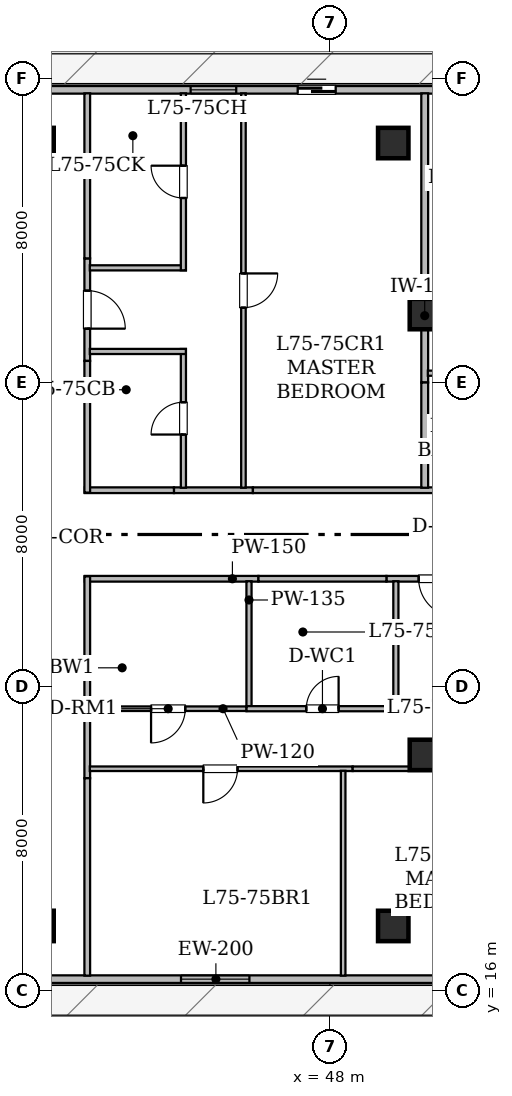
"""IFC4 building model, lengths in metres.
Left out: names, types, materials, properties, quantities, classifications, styles, units other than length and angle.
Written with IfcOpenShell. Run it as: python <this file> out.ifc"""

import sys

from ifc_helpers import new_model, si_unit, direction, frame, frame_2d, origin, origin_2d, place, context, subcontext, project, spatial, rectangle, hollow_rectangle, extrude, element, fill, save


model = new_model("IFC4")
c1 = context("Model", 3, precision=1e-05, world=origin(), true_north=direction((0.0, 1.0)))
c2 = subcontext(c1, "Body", "Model", "MODEL_VIEW")
j1 = project(units=[si_unit("LENGTHUNIT", "METRE"), si_unit("PLANEANGLEUNIT", "RADIAN")], contexts=[c1])
p1 = place(None, origin())
s1 = spatial("IfcSite", under=j1, at=p1, CompositionType="ELEMENT")
p2 = place(p1, origin())
s2 = spatial("IfcBuilding", under=s1, at=p2, CompositionType="ELEMENT")
p3 = place(p2, frame((0.0, 0.0, 294.65)))
s3 = spatial("IfcBuildingStorey", under=s2, at=p3, CompositionType="ELEMENT", Elevation=294.65)
for number, where, z_axis, x_axis in (
    (1, (40.333, 17.7, 0.025), (0.0, 0.0, 1.0), (1.0, 0.0, 0.0)),
    (2, (49.667, 17.7, 0.025), (0.0, 0.0, 1.0), (1.0, 0.0, 0.0)),
    (3, (40.333, 38.3, 0.025), (0.0, 0.0, 1.0), (1.0, 0.0, 0.0)),
    (4, (49.667, 38.3, 0.025), (0.0, 0.0, 1.0), (1.0, 0.0, 0.0)),
):
    element("IfcColumn", number, at=place(p3, frame(where, z_axis=z_axis, x_axis=x_axis)), inside=s3, PredefinedType="COLUMN", context=c2, shape_type="SweptSolid", body=[
        extrude(hollow_rectangle(XDim=0.8, YDim=0.8, WallThickness=0.04, at=origin_2d()), origin(), (0.0, 0.0, 1.0), 4.175),
    ])
for number, where, z_axis, x_axis in (
    (5, (50.5, 22.2, 0.0), (0.0, 0.0, 1.0), (1.0, 0.0, 0.0)),
    (6, (50.5, 33.8, 0.0), (0.0, 0.0, 1.0), (1.0, 0.0, 0.0)),
):
    element("IfcColumn", number, at=place(p3, frame(where, z_axis=z_axis, x_axis=x_axis)), inside=s3, PredefinedType="COLUMN", context=c2, shape_type="SweptSolid", body=[
        extrude(hollow_rectangle(XDim=0.8, YDim=0.8, WallThickness=0.04, at=origin_2d()), origin(), (0.0, 0.0, 1.0), 4.2),
    ])
p4 = place(p3, frame((60.759, 16.3, 0.0), z_axis=(0.0, 0.0, 1.0), x_axis=(-1.0, 0.0, 0.0)))
e7 = element("IfcWall", 7, at=p4, inside=s3, PredefinedType="STANDARD", context=c2, shape_type="SweptSolid", body=[
    extrude(rectangle(XDim=31.518, YDim=0.2, at=frame_2d((15.759, 0.0))), origin(), (0.0, 0.0, 1.0), 3.95),
])
p5 = place(p4, frame((6.066, 0.0, 0.0)))
e8 = element("IfcOpeningElement", 8, at=p5, cuts=e7, PredefinedType="OPENING", context=c2, shape_type="SweptSolid", body=[
    extrude(rectangle(XDim=1.0, YDim=2.15, at=frame_2d((0.5, 1.075))), frame((0.0, 0.11, 0.0), z_axis=(0.0, -1.0, 0.0), x_axis=(1.0, 0.0, 0.0)), (0.0, 0.0, 1.0), 0.22),
])
p6 = place(p4, frame((14.877, 0.0, 0.85)))
e9 = element("IfcOpeningElement", 9, at=p6, cuts=e7, PredefinedType="OPENING", context=c2, shape_type="SweptSolid", body=[
    extrude(rectangle(XDim=1.8, YDim=0.92, at=frame_2d((0.9, 0.46))), frame((0.0, 0.11, 0.0), z_axis=(0.0, -1.0, 0.0), x_axis=(1.0, 0.0, 0.0)), (0.0, 0.0, 1.0), 0.22),
])
p7 = place(p3, frame((29.302, 39.7, 0.0), z_axis=(0.0, 0.0, 1.0), x_axis=(1.0, 0.0, 0.0)))
e10 = element("IfcWall", 10, at=p7, inside=s3, PredefinedType="STANDARD", context=c2, shape_type="SweptSolid", body=[
    extrude(rectangle(XDim=31.457, YDim=0.2, at=frame_2d((15.729, 0.0))), origin(), (0.0, 0.0, 1.0), 3.95),
])
p8 = place(p7, frame((17.85, 0.0, 0.0)))
e11 = element("IfcOpeningElement", 11, at=p8, cuts=e10, PredefinedType="OPENING", context=c2, shape_type="SweptSolid", body=[
    extrude(rectangle(XDim=1.0, YDim=2.15, at=frame_2d((0.5, 1.075))), frame((0.0, 0.11, 0.0), z_axis=(0.0, -1.0, 0.0), x_axis=(1.0, 0.0, 0.0)), (0.0, 0.0, 1.0), 0.22),
])
p9 = place(p7, frame((15.033, 0.0, 0.78)))
e12 = element("IfcOpeningElement", 12, at=p9, cuts=e10, PredefinedType="OPENING", context=c2, shape_type="SweptSolid", body=[
    extrude(rectangle(XDim=1.2, YDim=1.5, at=frame_2d((0.6, 0.75))), frame((0.0, 0.11, 0.0), z_axis=(0.0, -1.0, 0.0), x_axis=(1.0, 0.0, 0.0)), (0.0, 0.0, 1.0), 0.22),
])
p10 = place(p7, frame((23.979, 0.0, 0.85)))
e13 = element("IfcOpeningElement", 13, at=p10, cuts=e10, PredefinedType="OPENING", context=c2, shape_type="SweptSolid", body=[
    extrude(rectangle(XDim=1.8, YDim=0.92, at=frame_2d((0.9, 0.46))), frame((0.0, 0.11, 0.0), z_axis=(0.0, -1.0, 0.0), x_axis=(1.0, 0.0, 0.0)), (0.0, 0.0, 1.0), 0.22),
])
p11 = place(p3, frame((46.12, 26.835, 0.0), z_axis=(0.0, 0.0, 1.0), x_axis=(-1.0, 0.0, 0.0)))
e14 = element("IfcWall", 14, at=p11, inside=s3, PredefinedType="STANDARD", context=c2, shape_type="SweptSolid", body=[
    extrude(rectangle(XDim=4.57, YDim=0.15, at=frame_2d((2.285, 0.0))), origin(), (0.0, 0.0, 1.0), 3.95),
])
p12 = place(p3, frame((41.615, 26.898, 0.0), z_axis=(0.0, 0.0, 1.0), x_axis=(0.0, -1.0, 0.0)))
e15 = element("IfcWall", 15, at=p12, inside=s3, PredefinedType="STANDARD", context=c2, shape_type="SweptSolid", body=[
    extrude(rectangle(XDim=3.731, YDim=0.15, at=frame_2d((1.865, 0.0))), origin(), (0.0, 0.0, 1.0), 3.245),
])
p13 = place(p3, frame((52.185, 26.835, 0.0), z_axis=(0.0, 0.0, 1.0), x_axis=(-1.0, 0.0, 0.0)))
e16 = element("IfcWall", 16, at=p13, inside=s3, PredefinedType="STANDARD", context=c2, shape_type="SweptSolid", body=[
    extrude(rectangle(XDim=2.698, YDim=0.15, at=frame_2d((1.349, 0.0))), origin(), (0.0, 0.0, 1.0), 3.245),
])
p14 = place(p13, frame((0.849, 0.0, 0.0)))
e17 = element("IfcOpeningElement", 17, at=p14, cuts=e16, PredefinedType="OPENING", context=c2, shape_type="SweptSolid", body=[
    extrude(rectangle(XDim=1.0, YDim=2.15, at=frame_2d((0.5, 1.075))), frame((0.0, 0.085, 0.0), z_axis=(0.0, -1.0, 0.0), x_axis=(1.0, 0.0, 0.0)), (0.0, 0.0, 1.0), 0.17),
])
p15 = place(p3, frame((41.615, 23.167, 0.0), z_axis=(0.0, 0.0, 1.0), x_axis=(0.0, -1.0, 0.0)))
e18 = element("IfcWall", 18, at=p15, inside=s3, PredefinedType="STANDARD", context=c2, shape_type="SweptSolid", body=[
    extrude(rectangle(XDim=1.58, YDim=0.15, at=frame_2d((0.79, 0.0))), origin(), (0.0, 0.0, 1.0), 3.95),
])
p16 = place(p3, frame((49.487, 26.835, 0.0), z_axis=(0.0, 0.0, 1.0), x_axis=(-1.0, 0.0, 0.0)))
e19 = element("IfcWall", 19, at=p16, inside=s3, PredefinedType="STANDARD", context=c2, shape_type="SweptSolid", body=[
    extrude(rectangle(XDim=3.367, YDim=0.15, at=frame_2d((1.684, 0.0))), origin(), (0.0, 0.0, 1.0), 3.95),
])
p17 = place(p3, frame((41.615, 21.587, 0.0), z_axis=(0.0, 0.0, 1.0), x_axis=(0.0, -1.0, 0.0)))
e20 = element("IfcWall", 20, at=p17, inside=s3, PredefinedType="STANDARD", context=c2, shape_type="SweptSolid", body=[
    extrude(rectangle(XDim=5.195, YDim=0.15, at=frame_2d((2.597, 0.0))), origin(), (0.0, 0.0, 1.0), 3.407),
])
p18 = place(p3, frame((43.896, 29.165, 0.0), z_axis=(0.0, 0.0, 1.0), x_axis=(1.0, 0.0, 0.0)))
e21 = element("IfcWall", 21, at=p18, inside=s3, PredefinedType="STANDARD", context=c2, shape_type="SweptSolid", body=[
    extrude(rectangle(XDim=2.078, YDim=0.15, at=frame_2d((1.039, 0.0))), origin(), (0.0, 0.0, 1.0), 3.95),
])
p19 = place(p3, frame((41.615, 35.265, 0.0), z_axis=(0.0, 0.0, 1.0), x_axis=(0.0, -1.0, 0.0)))
e22 = element("IfcWall", 22, at=p19, inside=s3, PredefinedType="STANDARD", context=c2, shape_type="SweptSolid", body=[
    extrude(rectangle(XDim=2.698, YDim=0.15, at=frame_2d((1.349, 0.0))), origin(), (0.0, 0.0, 1.0), 3.95),
])
p20 = place(p19, frame((0.849, 0.0, 0.0)))
e23 = element("IfcOpeningElement", 23, at=p20, cuts=e22, PredefinedType="OPENING", context=c2, shape_type="SweptSolid", body=[
    extrude(rectangle(XDim=1.0, YDim=2.15, at=frame_2d((0.5, 1.075))), frame((0.0, 0.085, 0.0), z_axis=(0.0, -1.0, 0.0), x_axis=(1.0, 0.0, 0.0)), (0.0, 0.0, 1.0), 0.17),
])
p21 = place(p3, frame((41.55, 29.165, 0.0), z_axis=(0.0, 0.0, 1.0), x_axis=(1.0, 0.0, 0.0)))
e24 = element("IfcWall", 24, at=p21, inside=s3, PredefinedType="STANDARD", context=c2, shape_type="SweptSolid", body=[
    extrude(rectangle(XDim=2.346, YDim=0.15, at=frame_2d((1.173, 0.0))), origin(), (0.0, 0.0, 1.0), 3.95),
])
p22 = place(p3, frame((41.615, 32.567, 0.0), z_axis=(0.0, 0.0, 1.0), x_axis=(0.0, -1.0, 0.0)))
e25 = element("IfcWall", 25, at=p22, inside=s3, PredefinedType="STANDARD", context=c2, shape_type="SweptSolid", body=[
    extrude(rectangle(XDim=3.465, YDim=0.15, at=frame_2d((1.732, 0.0))), origin(), (0.0, 0.0, 1.0), 3.95),
])
p23 = place(p3, frame((41.615, 39.608, 0.0), z_axis=(0.0, 0.0, 1.0), x_axis=(0.0, -1.0, 0.0)))
e26 = element("IfcWall", 26, at=p23, inside=s3, PredefinedType="STANDARD", context=c2, shape_type="SweptSolid", body=[
    extrude(rectangle(XDim=4.343, YDim=0.15, at=frame_2d((2.171, 0.0))), origin(), (0.0, 0.0, 1.0), 3.245),
])
p24 = place(p3, frame((45.974, 29.165, 0.0), z_axis=(0.0, 0.0, 1.0), x_axis=(1.0, 0.0, 0.0)))
e27 = element("IfcWall", 27, at=p24, inside=s3, PredefinedType="STANDARD", context=c2, shape_type="SweptSolid", body=[
    extrude(rectangle(XDim=4.77, YDim=0.15, at=frame_2d((2.385, 0.0))), origin(), (0.0, 0.0, 1.0), 3.245),
])
p25 = place(p3, frame((45.806, 23.416, 0.0), z_axis=(0.0, 0.0, 1.0), x_axis=(-1.0, 0.0, 0.0)))
e28 = element("IfcWall", 28, at=p25, inside=s3, PredefinedType="PARTITIONING", context=c2, shape_type="SweptSolid", body=[
    extrude(rectangle(XDim=4.124, YDim=0.12, at=frame_2d((2.062, 0.0))), origin(), (0.0, 0.0, 1.0), 3.245),
])
p26 = place(p25, frame((1.612, 0.0, 0.0)))
e29 = element("IfcOpeningElement", 29, at=p26, cuts=e28, PredefinedType="OPENING", context=c2, shape_type="SweptSolid", body=[
    extrude(rectangle(XDim=0.9, YDim=2.1, at=frame_2d((0.45, 1.05))), frame((0.0, 0.07, 0.0), z_axis=(0.0, -1.0, 0.0), x_axis=(1.0, 0.0, 0.0)), (0.0, 0.0, 1.0), 0.14),
])
p27 = place(p3, frame((45.871, 26.77, 0.0), z_axis=(0.0, 0.0, 1.0), x_axis=(0.0, -1.0, 0.0)))
e30 = element("IfcWall", 30, at=p27, inside=s3, PredefinedType="PARTITIONING", context=c2, shape_type="SweptSolid", body=[
    extrude(rectangle(XDim=3.289, YDim=0.135, at=frame_2d((1.645, 0.0))), origin(), (0.0, 0.0, 1.0), 3.95),
])
p28 = place(p3, frame((45.806, 23.416, 0.0), z_axis=(0.0, 0.0, 1.0), x_axis=(1.0, 0.0, 0.0)))
e31 = element("IfcWall", 31, at=p28, inside=s3, PredefinedType="PARTITIONING", context=c2, shape_type="SweptSolid", body=[
    extrude(rectangle(XDim=3.995, YDim=0.135, at=frame_2d((1.998, 0.0))), origin(), (0.0, 0.0, 1.0), 3.245),
])
p29 = place(p28, frame((1.573, 0.0, 0.0)))
e32 = element("IfcOpeningElement", 32, at=p29, cuts=e31, PredefinedType="OPENING", context=c2, shape_type="SweptSolid", body=[
    extrude(rectangle(XDim=0.85, YDim=2.1, at=frame_2d((0.425, 1.05))), frame((0.0, 0.077, 0.0), z_axis=(0.0, -1.0, 0.0), x_axis=(1.0, 0.0, 0.0)), (0.0, 0.0, 1.0), 0.155),
])
p30 = place(p3, frame((49.736, 23.351, 0.0), z_axis=(0.0, 0.0, 1.0), x_axis=(0.0, 1.0, 0.0)))
e33 = element("IfcWall", 33, at=p30, inside=s3, PredefinedType="PARTITIONING", context=c2, shape_type="SweptSolid", body=[
    extrude(rectangle(XDim=3.419, YDim=0.135, at=frame_2d((1.709, 0.0))), origin(), (0.0, 0.0, 1.0), 3.95),
])
p31 = place(p3, frame((48.599, 21.836, 0.0), z_axis=(0.0, 0.0, 1.0), x_axis=(-1.0, 0.0, 0.0)))
e34 = element("IfcWall", 34, at=p31, inside=s3, PredefinedType="PARTITIONING", context=c2, shape_type="SweptSolid", body=[
    extrude(rectangle(XDim=6.917, YDim=0.12, at=frame_2d((3.458, 0.0))), origin(), (0.0, 0.0, 1.0), 3.95),
])
p32 = place(p31, frame((3.03, 0.0, 0.0)))
e35 = element("IfcOpeningElement", 35, at=p32, cuts=e34, PredefinedType="OPENING", context=c2, shape_type="SweptSolid", body=[
    extrude(rectangle(XDim=0.9, YDim=2.1, at=frame_2d((0.45, 1.05))), frame((0.0, 0.07, 0.0), z_axis=(0.0, -1.0, 0.0), x_axis=(1.0, 0.0, 0.0)), (0.0, 0.0, 1.0), 0.14),
])
p33 = place(p3, frame((56.802, 21.836, 0.0), z_axis=(0.0, 0.0, 1.0), x_axis=(-1.0, 0.0, 0.0)))
e36 = element("IfcWall", 36, at=p33, inside=s3, PredefinedType="PARTITIONING", context=c2, shape_type="SweptSolid", body=[
    extrude(rectangle(XDim=8.203, YDim=0.12, at=frame_2d((4.102, 0.0))), origin(), (0.0, 0.0, 1.0), 3.245),
])
p34 = place(p33, frame((3.672, 0.0, 0.0)))
e37 = element("IfcOpeningElement", 37, at=p34, cuts=e36, PredefinedType="OPENING", context=c2, shape_type="SweptSolid", body=[
    extrude(rectangle(XDim=0.9, YDim=2.1, at=frame_2d((0.45, 1.05))), frame((0.0, 0.07, 0.0), z_axis=(0.0, -1.0, 0.0), x_axis=(1.0, 0.0, 0.0)), (0.0, 0.0, 1.0), 0.14),
])
p35 = place(p3, frame((48.349, 21.782, 0.0), z_axis=(0.0, 0.0, 1.0), x_axis=(0.0, -1.0, 0.0)))
e38 = element("IfcWall", 38, at=p35, inside=s3, PredefinedType="PARTITIONING", context=c2, shape_type="SweptSolid", body=[
    extrude(rectangle(XDim=5.39, YDim=0.12, at=frame_2d((2.695, 0.0))), origin(), (0.0, 0.0, 1.0), 3.407),
])
p36 = place(p3, frame((44.145, 29.23, 0.0), z_axis=(0.0, 0.0, 1.0), x_axis=(0.0, 1.0, 0.0)))
e39 = element("IfcWall", 39, at=p36, inside=s3, PredefinedType="PARTITIONING", context=c2, shape_type="SweptSolid", body=[
    extrude(rectangle(XDim=3.651, YDim=0.135, at=frame_2d((1.826, 0.0))), origin(), (0.0, 0.0, 1.0), 3.95),
])
p37 = place(p36, frame((1.4, 0.0, 0.0)))
e40 = element("IfcOpeningElement", 40, at=p37, cuts=e39, PredefinedType="OPENING", context=c2, shape_type="SweptSolid", body=[
    extrude(rectangle(XDim=0.85, YDim=2.1, at=frame_2d((0.425, 1.05))), frame((0.0, 0.077, 0.0), z_axis=(0.0, -1.0, 0.0), x_axis=(1.0, 0.0, 0.0)), (0.0, 0.0, 1.0), 0.155),
])
for number, where, z_axis, x_axis in (
    (41, (44.21, 32.816, 0.0), (0.0, 0.0, 1.0), (-1.0, 0.0, 0.0)),
    (42, (41.682, 35.016, 0.0), (0.0, 0.0, 1.0), (1.0, 0.0, 0.0)),
):
    element("IfcWall", number, at=place(p3, frame(where, z_axis=z_axis, x_axis=x_axis)), inside=s3, PredefinedType="PARTITIONING", context=c2, shape_type="SweptSolid", body=[
        extrude(rectangle(XDim=2.528, YDim=0.135, at=frame_2d((1.264, 0.0))), origin(), (0.0, 0.0, 1.0), 3.95),
    ])
p38 = place(p3, frame((44.145, 34.951, 0.0), z_axis=(0.0, 0.0, 1.0), x_axis=(0.0, 1.0, 0.0)))
e43 = element("IfcWall", 43, at=p38, inside=s3, PredefinedType="PARTITIONING", context=c2, shape_type="SweptSolid", body=[
    extrude(rectangle(XDim=4.657, YDim=0.135, at=frame_2d((2.329, 0.0))), origin(), (0.0, 0.0, 1.0), 3.245),
])
p39 = place(p38, frame((1.903, 0.0, 0.0)))
e44 = element("IfcOpeningElement", 44, at=p39, cuts=e43, PredefinedType="OPENING", context=c2, shape_type="SweptSolid", body=[
    extrude(rectangle(XDim=0.85, YDim=2.1, at=frame_2d((0.425, 1.05))), frame((0.0, 0.077, 0.0), z_axis=(0.0, -1.0, 0.0), x_axis=(1.0, 0.0, 0.0)), (0.0, 0.0, 1.0), 0.155),
])
p40 = place(p3, frame((45.725, 39.608, 0.0), z_axis=(0.0, 0.0, 1.0), x_axis=(0.0, -1.0, 0.0)))
e45 = element("IfcWall", 45, at=p40, inside=s3, PredefinedType="PARTITIONING", context=c2, shape_type="SweptSolid", body=[
    extrude(rectangle(XDim=10.378, YDim=0.12, at=frame_2d((5.189, 0.0))), origin(), (0.0, 0.0, 1.0), 3.245),
])
p41 = place(p40, frame((4.739, 0.0, 0.0)))
e46 = element("IfcOpeningElement", 46, at=p41, cuts=e45, PredefinedType="OPENING", context=c2, shape_type="SweptSolid", body=[
    extrude(rectangle(XDim=0.9, YDim=2.1, at=frame_2d((0.45, 1.05))), frame((0.0, 0.07, 0.0), z_axis=(0.0, -1.0, 0.0), x_axis=(1.0, 0.0, 0.0)), (0.0, 0.0, 1.0), 0.14),
])
p42 = place(p3, frame((50.495, 34.068, 0.0), z_axis=(0.0, 0.0, 1.0), x_axis=(0.0, -1.0, 0.0)))
e47 = element("IfcWall", 47, at=p42, inside=s3, PredefinedType="STANDARD", context=c2, shape_type="SweptSolid", body=[
    extrude(rectangle(XDim=2.069, YDim=0.18, at=frame_2d((1.035, 0.0))), origin(), (0.0, 0.0, 1.0), 3.245),
])
p43 = place(p3, frame((50.495, 31.999, 0.0), z_axis=(0.0, 0.0, 1.0), x_axis=(0.0, -1.0, 0.0)))
e48 = element("IfcWall", 48, at=p43, inside=s3, PredefinedType="STANDARD", context=c2, shape_type="SweptSolid", body=[
    extrude(rectangle(XDim=2.769, YDim=0.18, at=frame_2d((1.385, 0.0))), origin(), (0.0, 0.0, 1.0), 3.245),
])
p44 = place(p3, frame((50.495, 39.608, 0.0), z_axis=(0.0, 0.0, 1.0), x_axis=(0.0, -1.0, 0.0)))
e49 = element("IfcWall", 49, at=p44, inside=s3, PredefinedType="STANDARD", context=c2, shape_type="SweptSolid", body=[
    extrude(rectangle(XDim=5.54, YDim=0.18, at=frame_2d((2.77, 0.0))), origin(), (0.0, 0.0, 1.0), 3.245),
])
p45 = place(p3, frame((55.396, 32.244, 0.0), z_axis=(0.0, 0.0, 1.0), x_axis=(-1.0, 0.0, 0.0)))
e50 = element("IfcWall", 50, at=p45, inside=s3, PredefinedType="PARTITIONING", context=c2, shape_type="SweptSolid", body=[
    extrude(rectangle(XDim=4.819, YDim=0.135, at=frame_2d((2.41, 0.0))), origin(), (0.0, 0.0, 1.0), 3.245),
])
p46 = place(p45, frame((1.984, 0.0, 0.0)))
e51 = element("IfcOpeningElement", 51, at=p46, cuts=e50, PredefinedType="OPENING", context=c2, shape_type="SweptSolid", body=[
    extrude(rectangle(XDim=0.85, YDim=2.1, at=frame_2d((0.425, 1.05))), frame((0.0, 0.077, 0.0), z_axis=(0.0, -1.0, 0.0), x_axis=(1.0, 0.0, 0.0)), (0.0, 0.0, 1.0), 0.155),
])
p47 = place(p3, frame((50.577, 33.824, 0.0), z_axis=(0.0, 0.0, 1.0), x_axis=(1.0, 0.0, 0.0)))
e52 = element("IfcWall", 52, at=p47, inside=s3, PredefinedType="PARTITIONING", context=c2, shape_type="SweptSolid", body=[
    extrude(rectangle(XDim=7.528, YDim=0.12, at=frame_2d((3.764, 0.0))), origin(), (0.0, 0.0, 1.0), 3.245),
])
p48 = place(p47, frame((3.293, 0.0, 0.0)))
e53 = element("IfcOpeningElement", 53, at=p48, cuts=e52, PredefinedType="OPENING", context=c2, shape_type="SweptSolid", body=[
    extrude(rectangle(XDim=0.9, YDim=2.1, at=frame_2d((0.45, 1.05))), frame((0.0, 0.07, 0.0), z_axis=(0.0, -1.0, 0.0), x_axis=(1.0, 0.0, 0.0)), (0.0, 0.0, 1.0), 0.14),
])
p49 = place(p8, origin())
e54 = element("IfcDoor", 54, at=p49, inside=s3, OperationType="SLIDING_TO_LEFT", PredefinedType="DOOR", context=c2, shape_type="SweptSolid", body=[
    extrude(rectangle(XDim=1.0, YDim=2.15, at=frame_2d((0.5, 1.075))), frame((0.0, 0.025, 0.0), z_axis=(0.0, -1.0, 0.0), x_axis=(1.0, 0.0, 0.0)), (0.0, 0.0, 1.0), 0.05),
])
fill(e11, e54)
p50 = place(p6, origin())
e55 = element("IfcWindow", 55, at=p50, inside=s3, PartitioningType="SINGLE_PANEL", PredefinedType="WINDOW", context=c2, shape_type="SweptSolid", body=[
    extrude(rectangle(XDim=1.8, YDim=0.92, at=frame_2d((0.9, 0.46))), frame((0.0, 0.03, 0.0), z_axis=(0.0, -1.0, 0.0), x_axis=(1.0, 0.0, 0.0)), (0.0, 0.0, 1.0), 0.06),
])
fill(e9, e55)
p51 = place(p9, origin())
e56 = element("IfcWindow", 56, at=p51, inside=s3, PartitioningType="SINGLE_PANEL", PredefinedType="WINDOW", context=c2, shape_type="SweptSolid", body=[
    extrude(rectangle(XDim=1.2, YDim=1.5, at=frame_2d((0.6, 0.75))), frame((0.0, 0.03, 0.0), z_axis=(0.0, -1.0, 0.0), x_axis=(1.0, 0.0, 0.0)), (0.0, 0.0, 1.0), 0.06),
])
fill(e12, e56)
p52 = place(p14, origin())
e57 = element("IfcDoor", 57, at=p52, inside=s3, OperationType="SINGLE_SWING_LEFT", PredefinedType="DOOR", context=c2, shape_type="SweptSolid", body=[
    extrude(rectangle(XDim=1.0, YDim=2.15, at=frame_2d((0.5, 1.075))), frame((0.0, 0.025, 0.0), z_axis=(0.0, -1.0, 0.0), x_axis=(1.0, 0.0, 0.0)), (0.0, 0.0, 1.0), 0.05),
])
fill(e17, e57)
p53 = place(p20, origin())
e58 = element("IfcDoor", 58, at=p53, inside=s3, OperationType="SINGLE_SWING_RIGHT", PredefinedType="DOOR", context=c2, shape_type="SweptSolid", body=[
    extrude(rectangle(XDim=1.0, YDim=2.15, at=frame_2d((0.5, 1.075))), frame((0.0, 0.025, 0.0), z_axis=(0.0, -1.0, 0.0), x_axis=(1.0, 0.0, 0.0)), (0.0, 0.0, 1.0), 0.05),
])
fill(e23, e58)
p54 = place(p26, origin())
e59 = element("IfcDoor", 59, at=p54, inside=s3, OperationType="SINGLE_SWING_RIGHT", PredefinedType="DOOR", context=c2, shape_type="SweptSolid", body=[
    extrude(rectangle(XDim=0.9, YDim=2.1, at=frame_2d((0.45, 1.05))), frame((0.0, 0.025, 0.0), z_axis=(0.0, -1.0, 0.0), x_axis=(1.0, 0.0, 0.0)), (0.0, 0.0, 1.0), 0.05),
])
fill(e29, e59)
p55 = place(p29, origin())
e60 = element("IfcDoor", 60, at=p55, inside=s3, OperationType="SINGLE_SWING_RIGHT", PredefinedType="DOOR", context=c2, shape_type="SweptSolid", body=[
    extrude(rectangle(XDim=0.85, YDim=2.1, at=frame_2d((0.425, 1.05))), frame((0.0, 0.025, 0.0), z_axis=(0.0, -1.0, 0.0), x_axis=(1.0, 0.0, 0.0)), (0.0, 0.0, 1.0), 0.05),
])
fill(e32, e60)
p56 = place(p32, origin())
e61 = element("IfcDoor", 61, at=p56, inside=s3, OperationType="SINGLE_SWING_RIGHT", PredefinedType="DOOR", context=c2, shape_type="SweptSolid", body=[
    extrude(rectangle(XDim=0.9, YDim=2.1, at=frame_2d((0.45, 1.05))), frame((0.0, 0.025, 0.0), z_axis=(0.0, -1.0, 0.0), x_axis=(1.0, 0.0, 0.0)), (0.0, 0.0, 1.0), 0.05),
])
fill(e35, e61)
p57 = place(p37, origin())
e62 = element("IfcDoor", 62, at=p57, inside=s3, OperationType="SINGLE_SWING_LEFT", PredefinedType="DOOR", context=c2, shape_type="SweptSolid", body=[
    extrude(rectangle(XDim=0.85, YDim=2.1, at=frame_2d((0.425, 1.05))), frame((0.0, 0.025, 0.0), z_axis=(0.0, -1.0, 0.0), x_axis=(1.0, 0.0, 0.0)), (0.0, 0.0, 1.0), 0.05),
])
fill(e40, e62)
p58 = place(p39, origin())
e63 = element("IfcDoor", 63, at=p58, inside=s3, OperationType="SINGLE_SWING_RIGHT", PredefinedType="DOOR", context=c2, shape_type="SweptSolid", body=[
    extrude(rectangle(XDim=0.85, YDim=2.1, at=frame_2d((0.425, 1.05))), frame((0.0, 0.025, 0.0), z_axis=(0.0, -1.0, 0.0), x_axis=(1.0, 0.0, 0.0)), (0.0, 0.0, 1.0), 0.05),
])
fill(e44, e63)
p59 = place(p41, origin())
e64 = element("IfcDoor", 64, at=p59, inside=s3, OperationType="SINGLE_SWING_LEFT", PredefinedType="DOOR", context=c2, shape_type="SweptSolid", body=[
    extrude(rectangle(XDim=0.9, YDim=2.1, at=frame_2d((0.45, 1.05))), frame((0.0, 0.025, 0.0), z_axis=(0.0, -1.0, 0.0), x_axis=(1.0, 0.0, 0.0)), (0.0, 0.0, 1.0), 0.05),
])
fill(e46, e64)
save(model, sys.argv[1])
